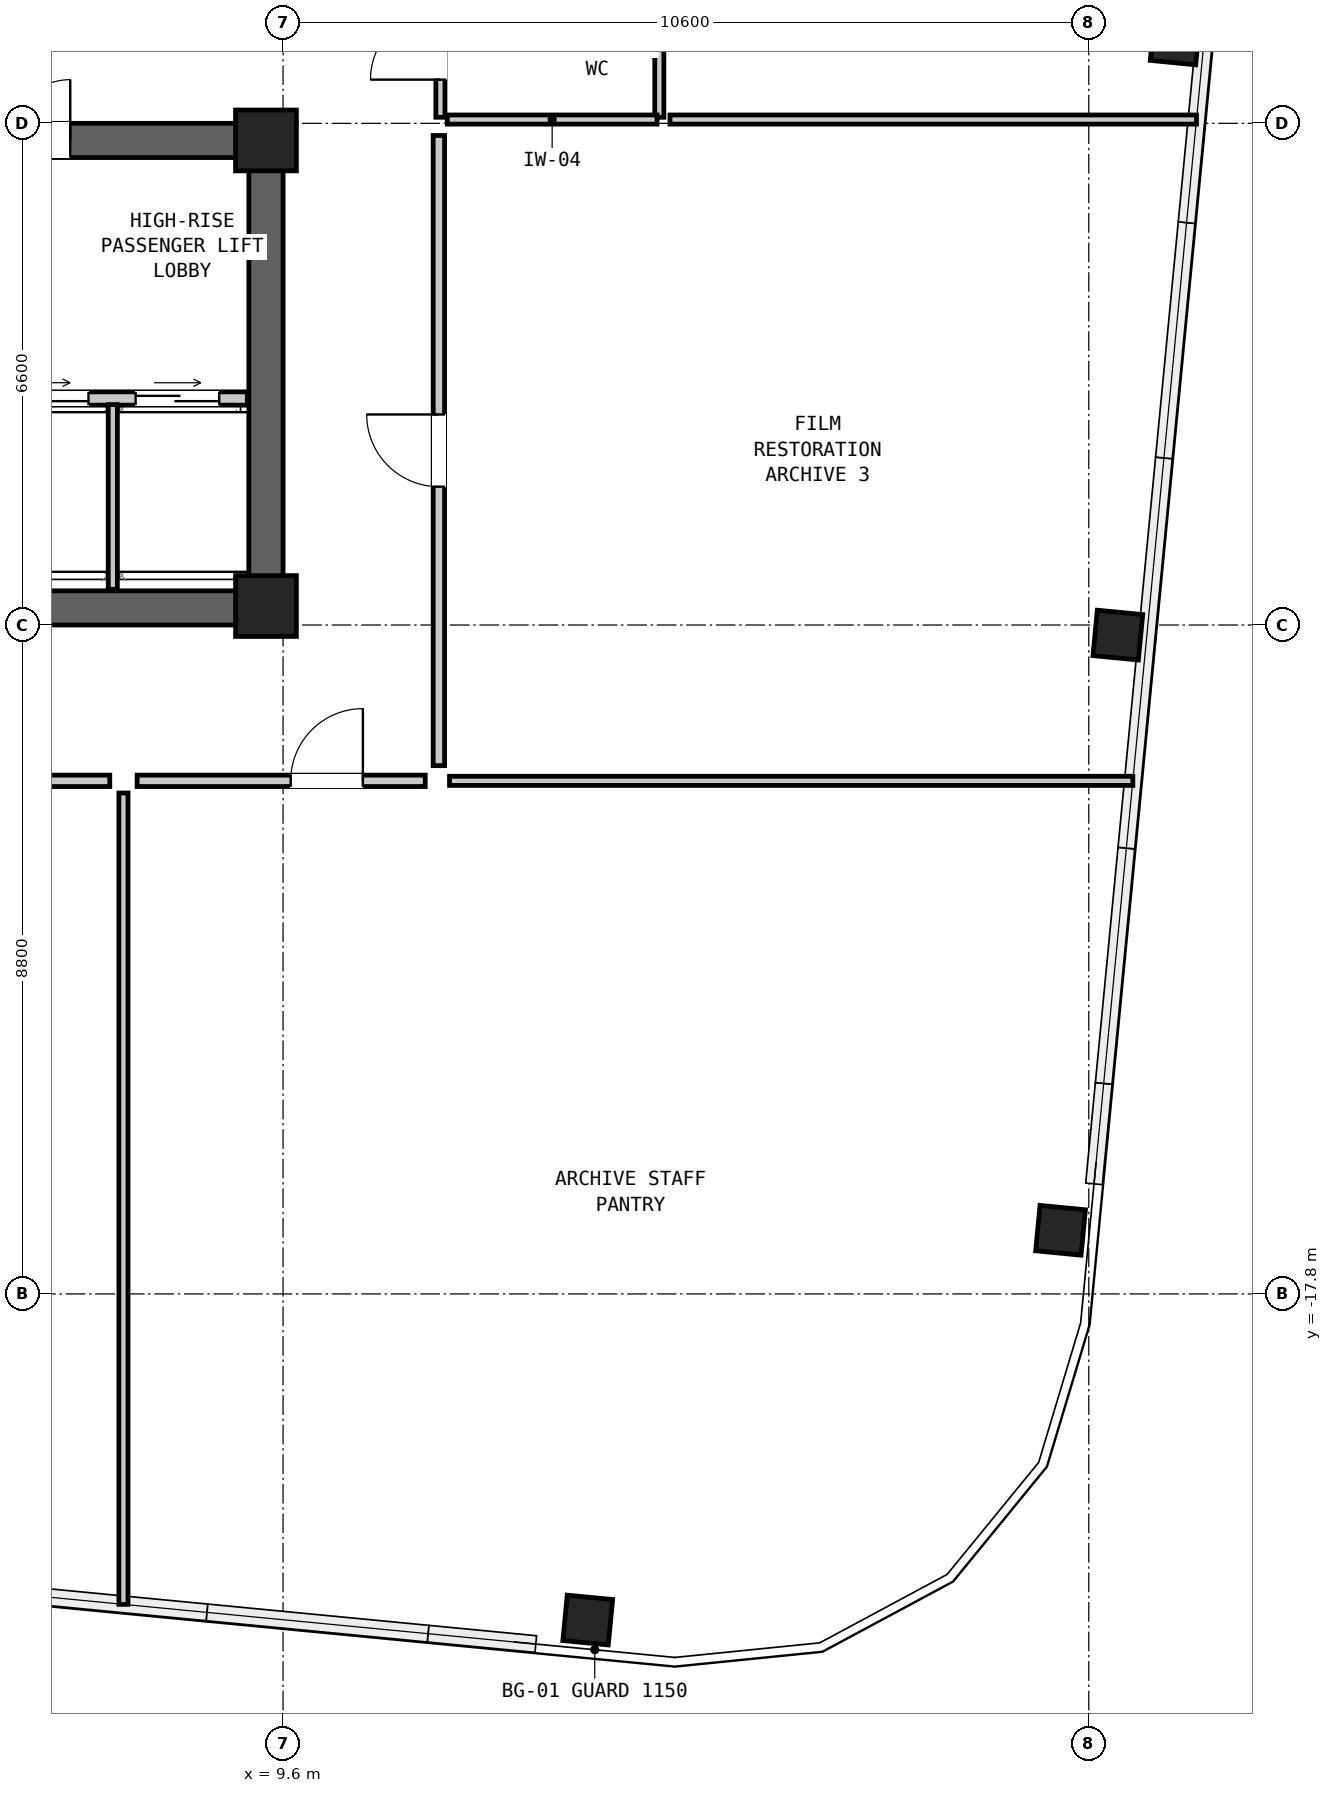
"""IFC4 building model, lengths in metres.
Left out: names, types, materials, properties, quantities, classifications, styles, units other than length and angle.
Written with IfcOpenShell. Run it as: python <this file> out.ifc"""

import sys

from ifc_helpers import new_model, si_unit, direction, frame, frame_2d, origin, origin_2d, place, context, subcontext, project, spatial, rectangle, hollow_rectangle, extrude, element, fill, save


model = new_model("IFC4")
c1 = context("Model", 3, precision=1e-05, world=origin(), true_north=direction((0.0, 1.0)))
c2 = subcontext(c1, "Body", "Model", "MODEL_VIEW")
j1 = project(units=[si_unit("LENGTHUNIT", "METRE"), si_unit("PLANEANGLEUNIT", "RADIAN")], contexts=[c1])
p1 = place(None, origin())
s1 = spatial("IfcSite", under=j1, at=p1, CompositionType="ELEMENT")
p2 = place(p1, origin())
s2 = spatial("IfcBuilding", under=s1, at=p2, CompositionType="ELEMENT")
p3 = place(p2, frame((0.0, 0.0, 261.15)))
s3 = spatial("IfcBuildingStorey", under=s2, at=p3, CompositionType="ELEMENT", Elevation=261.15)
p4 = place(p3, frame((-9.6, -8.775, 0.0), z_axis=(0.0, 0.0, 1.0), x_axis=(1.0, 0.0, 0.0)))
e1 = element("IfcWall", 1, at=p4, inside=s3, PredefinedType="SHEAR", context=c2, shape_type="SweptSolid", body=[
    extrude(rectangle(XDim=19.2, YDim=0.45, at=frame_2d((9.6, 0.0))), origin(), (0.0, 0.0, 1.0), 3.05),
])
p5 = place(p3, frame((-9.6, -2.625, 0.0), z_axis=(0.0, 0.0, 1.0), x_axis=(1.0, 0.0, 0.0)))
e2 = element("IfcWall", 2, at=p5, inside=s3, PredefinedType="SHEAR", context=c2, shape_type="SweptSolid", body=[
    extrude(rectangle(XDim=19.2, YDim=0.45, at=frame_2d((9.6, 0.0))), origin(), (0.0, 0.0, 1.0), 3.05),
])
p6 = place(p5, frame((3.8, 0.0, 0.0)))
e3 = element("IfcOpeningElement", 3, at=p6, cuts=e2, PredefinedType="OPENING", context=c2, shape_type="SweptSolid", body=[
    extrude(rectangle(XDim=1.1, YDim=2.08, at=frame_2d((0.55, 1.04))), frame((0.0, 0.237, 0.0), z_axis=(0.0, -1.0, 0.0), x_axis=(1.0, 0.0, 0.0)), (0.0, 0.0, 1.0), 0.474),
])
p7 = place(p5, frame((10.15, 0.0, 0.0)))
e4 = element("IfcOpeningElement", 4, at=p7, cuts=e2, PredefinedType="OPENING", context=c2, shape_type="SweptSolid", body=[
    extrude(rectangle(XDim=0.9, YDim=2.05, at=frame_2d((0.45, 1.025))), frame((0.0, 0.237, 0.0), z_axis=(0.0, -1.0, 0.0), x_axis=(1.0, 0.0, 0.0)), (0.0, 0.0, 1.0), 0.474),
])
p8 = place(p5, frame((12.1, 0.0, 0.0)))
e5 = element("IfcOpeningElement", 5, at=p8, cuts=e2, PredefinedType="OPENING", context=c2, shape_type="SweptSolid", body=[
    extrude(rectangle(XDim=0.95, YDim=2.1, at=frame_2d((0.475, 1.05))), frame((0.0, 0.237, 0.0), z_axis=(0.0, -1.0, 0.0), x_axis=(1.0, 0.0, 0.0)), (0.0, 0.0, 1.0), 0.474),
])
p9 = place(p5, frame((14.8, 0.0, 0.0)))
e6 = element("IfcOpeningElement", 6, at=p9, cuts=e2, PredefinedType="OPENING", context=c2, shape_type="SweptSolid", body=[
    extrude(rectangle(XDim=1.6, YDim=2.12, at=frame_2d((0.8, 1.06))), frame((0.0, 0.237, 0.0), z_axis=(0.0, -1.0, 0.0), x_axis=(1.0, 0.0, 0.0)), (0.0, 0.0, 1.0), 0.474),
])
p10 = place(p3, frame((9.375, -9.0, 0.0), z_axis=(0.0, 0.0, 1.0), x_axis=(0.0, 1.0, 0.0)))
e7 = element("IfcWall", 7, at=p10, inside=s3, PredefinedType="SHEAR", context=c2, shape_type="SweptSolid", body=[
    extrude(rectangle(XDim=6.6, YDim=0.45, at=frame_2d((3.3, 0.0))), origin(), (0.0, 0.0, 1.0), 3.05),
])
for number, where, z_axis, x_axis in (
    (8, (13.608, -22.09, 0.0), (0.0, 0.0, 1.0), (0.995, -0.096, 0.0)),
    (9, (19.829, -16.963, 0.0), (0.0, 0.0, 1.0), (0.096, 0.995, 0.0)),
    (10, (20.583, -9.133, 0.0), (0.0, 0.0, 1.0), (0.096, 0.995, 0.0)),
    (11, (21.336, -1.302, 0.0), (0.0, 0.0, 1.0), (0.096, 0.995, 0.0)),
):
    element("IfcColumn", number, at=place(p3, frame(where, z_axis=z_axis, x_axis=x_axis)), inside=s3, PredefinedType="COLUMN", context=c2, shape_type="SweptSolid", body=[
        extrude(hollow_rectangle(XDim=0.6, YDim=0.6, WallThickness=0.04, at=origin_2d()), origin(), (0.0, 0.0, 1.0), 3.05),
    ])
for number, where, z_axis, x_axis in (
    (12, (9.375, -2.625, 0.0), (0.0, 0.0, 1.0), (1.0, 0.0, 0.0)),
    (13, (9.375, -8.75, 0.0), (0.0, 0.0, 1.0), (1.0, 0.0, 0.0)),
):
    element("IfcColumn", number, at=place(p3, frame(where, z_axis=z_axis, x_axis=x_axis)), inside=s3, PredefinedType="COLUMN", context=c2, shape_type="SweptSolid", body=[
        extrude(rectangle(XDim=0.8, YDim=0.8, at=origin_2d()), origin(), (0.0, 0.0, 1.0), 3.05),
    ])
p11 = place(p3, frame((4.0, -6.02, 0.0), z_axis=(0.0, 0.0, 1.0), x_axis=(1.0, 0.0, 0.0)))
e14 = element("IfcWall", 14, at=p11, inside=s3, PredefinedType="PARTITIONING", context=c2, shape_type="SweptSolid", body=[
    extrude(rectangle(XDim=5.13, YDim=0.175, at=frame_2d((2.565, 0.0))), origin(), (0.0, 0.0, 1.0), 2.86),
])
p12 = place(p11, frame((0.22, 0.0, 0.0)))
e15 = element("IfcOpeningElement", 15, at=p12, cuts=e14, PredefinedType="OPENING", context=c2, shape_type="SweptSolid", body=[
    extrude(rectangle(XDim=1.1, YDim=2.06, at=frame_2d((0.55, 1.03))), frame((0.0, 0.1, 0.0), z_axis=(0.0, -1.0, 0.0), x_axis=(1.0, 0.0, 0.0)), (0.0, 0.0, 1.0), 0.199),
])
p13 = place(p11, frame((1.94, 0.0, 0.0)))
e16 = element("IfcOpeningElement", 16, at=p13, cuts=e14, PredefinedType="OPENING", context=c2, shape_type="SweptSolid", body=[
    extrude(rectangle(XDim=1.1, YDim=2.06, at=frame_2d((0.55, 1.03))), frame((0.0, 0.1, 0.0), z_axis=(0.0, -1.0, 0.0), x_axis=(1.0, 0.0, 0.0)), (0.0, 0.0, 1.0), 0.199),
])
p14 = place(p11, frame((3.66, 0.0, 0.0)))
e17 = element("IfcOpeningElement", 17, at=p14, cuts=e14, PredefinedType="OPENING", context=c2, shape_type="SweptSolid", body=[
    extrude(rectangle(XDim=1.1, YDim=2.06, at=frame_2d((0.55, 1.03))), frame((0.0, 0.1, 0.0), z_axis=(0.0, -1.0, 0.0), x_axis=(1.0, 0.0, 0.0)), (0.0, 0.0, 1.0), 0.199),
])
p15 = place(p3, frame((7.36, -8.53, 0.0), z_axis=(0.0, 0.0, 1.0), x_axis=(0.0, 1.0, 0.0)))
e18 = element("IfcWall", 18, at=p15, inside=s3, PredefinedType="PARTITIONING", context=c2, shape_type="SweptSolid", body=[
    extrude(rectangle(XDim=2.43, YDim=0.12, at=frame_2d((1.215, 0.0))), origin(), (0.0, 0.0, 1.0), 2.86),
])
p16 = place(p3, frame((11.67, -2.32, 0.0), z_axis=(0.0, 0.0, 1.0), x_axis=(0.0, 1.0, 0.0)))
e19 = element("IfcWall", 19, at=p16, inside=s3, PredefinedType="PARTITIONING", context=c2, shape_type="SweptSolid", body=[
    extrude(rectangle(XDim=1.94, YDim=0.12, at=frame_2d((0.97, 0.0))), origin(), (0.0, 0.0, 1.0), 2.86),
])
p17 = place(p16, frame((0.495, 0.0, 0.0)))
e20 = element("IfcOpeningElement", 20, at=p17, cuts=e19, PredefinedType="OPENING", context=c2, shape_type="SweptSolid", body=[
    extrude(rectangle(XDim=0.92, YDim=2.1, at=frame_2d((0.46, 1.05))), frame((0.0, 0.072, 0.0), z_axis=(0.0, -1.0, 0.0), x_axis=(1.0, 0.0, 0.0)), (0.0, 0.0, 1.0), 0.144),
])
p18 = place(p3, frame((14.55, -2.32, 0.0), z_axis=(0.0, 0.0, 1.0), x_axis=(0.0, 1.0, 0.0)))
e21 = element("IfcWall", 21, at=p18, inside=s3, PredefinedType="PARTITIONING", context=c2, shape_type="SweptSolid", body=[
    extrude(rectangle(XDim=5.93, YDim=0.12, at=frame_2d((2.965, 0.0))), origin(), (0.0, 0.0, 1.0), 2.86),
])
p19 = place(p3, frame((11.76, -2.35, 0.0), z_axis=(0.0, 0.0, 1.0), x_axis=(1.0, 0.0, 0.0)))
e22 = element("IfcWall", 22, at=p19, inside=s3, PredefinedType="PARTITIONING", context=c2, shape_type="SweptSolid", body=[
    extrude(rectangle(XDim=2.76, YDim=0.12, at=frame_2d((1.38, 0.0))), origin(), (0.0, 0.0, 1.0), 1.981),
])
p20 = place(p3, frame((11.79, -11.05, 0.0), z_axis=(0.0, 0.0, 1.0), x_axis=(1.0, 0.0, 0.0)))
e23 = element("IfcWall", 23, at=p20, inside=s3, PredefinedType="PARTITIONING", context=c2, shape_type="SweptSolid", body=[
    extrude(rectangle(XDim=8.99, YDim=0.12, at=frame_2d((4.495, 0.0))), origin(), (0.0, 0.0, 1.0), 2.86),
])
p21 = place(p3, frame((7.5, -21.884, 0.0), z_axis=(0.0, 0.0, 1.0), x_axis=(0.0, 1.0, 0.0)))
e24 = element("IfcWall", 24, at=p21, inside=s3, PredefinedType="PARTITIONING", context=c2, shape_type="SweptSolid", body=[
    extrude(rectangle(XDim=10.674, YDim=0.12, at=frame_2d((5.337, 0.0))), origin(), (0.0, 0.0, 1.0), 2.86),
])
p22 = place(p3, frame((14.69, -2.35, 0.0), z_axis=(0.0, 0.0, 1.0), x_axis=(1.0, 0.0, 0.0)))
e25 = element("IfcWall", 25, at=p22, inside=s3, PredefinedType="PARTITIONING", context=c2, shape_type="SweptSolid", body=[
    extrude(rectangle(XDim=6.927, YDim=0.12, at=frame_2d((3.464, 0.0))), origin(), (0.0, 0.0, 1.0), 1.981),
])
p23 = place(p3, frame((1.68, -11.05, 0.0), z_axis=(0.0, 0.0, 1.0), x_axis=(1.0, 0.0, 0.0)))
e26 = element("IfcWall", 26, at=p23, inside=s3, PredefinedType="PARTITIONING", context=c2, shape_type="SweptSolid", body=[
    extrude(rectangle(XDim=5.64, YDim=0.15, at=frame_2d((2.82, 0.0))), origin(), (0.0, 0.0, 1.0), 2.86),
])
p24 = place(p23, frame((2.22, 0.0, 0.0)))
e27 = element("IfcOpeningElement", 27, at=p24, cuts=e26, PredefinedType="OPENING", context=c2, shape_type="SweptSolid", body=[
    extrude(rectangle(XDim=1.2, YDim=2.1, at=frame_2d((0.6, 1.05))), frame((0.0, 0.087, 0.0), z_axis=(0.0, -1.0, 0.0), x_axis=(1.0, 0.0, 0.0)), (0.0, 0.0, 1.0), 0.174),
])
p25 = place(p3, frame((7.68, -11.05, 0.0), z_axis=(0.0, 0.0, 1.0), x_axis=(1.0, 0.0, 0.0)))
e28 = element("IfcWall", 28, at=p25, inside=s3, PredefinedType="PARTITIONING", context=c2, shape_type="SweptSolid", body=[
    extrude(rectangle(XDim=3.79, YDim=0.15, at=frame_2d((1.895, 0.0))), origin(), (0.0, 0.0, 1.0), 2.86),
])
p26 = place(p25, frame((2.02, 0.0, 0.0)))
e29 = element("IfcOpeningElement", 29, at=p26, cuts=e28, PredefinedType="OPENING", context=c2, shape_type="SweptSolid", body=[
    extrude(rectangle(XDim=0.95, YDim=2.1, at=frame_2d((0.475, 1.05))), frame((0.0, 0.087, 0.0), z_axis=(0.0, -1.0, 0.0), x_axis=(1.0, 0.0, 0.0)), (0.0, 0.0, 1.0), 0.174),
])
p27 = place(p3, frame((11.65, -10.85, 0.0), z_axis=(0.0, 0.0, 1.0), x_axis=(0.0, 1.0, 0.0)))
e30 = element("IfcWall", 30, at=p27, inside=s3, PredefinedType="PARTITIONING", context=c2, shape_type="SweptSolid", body=[
    extrude(rectangle(XDim=8.29, YDim=0.15, at=frame_2d((4.145, 0.0))), origin(), (0.0, 0.0, 1.0), 2.86),
])
p28 = place(p27, frame((3.67, 0.0, 0.0)))
e31 = element("IfcOpeningElement", 31, at=p28, cuts=e30, PredefinedType="OPENING", context=c2, shape_type="SweptSolid", body=[
    extrude(rectangle(XDim=0.95, YDim=2.1, at=frame_2d((0.475, 1.05))), frame((0.0, 0.087, 0.0), z_axis=(0.0, -1.0, 0.0), x_axis=(1.0, 0.0, 0.0)), (0.0, 0.0, 1.0), 0.174),
])
p29 = place(p13, origin())
e32 = element("IfcDoor", 32, at=p29, inside=s3, OperationType="DOUBLE_DOOR_SLIDING", PredefinedType="DOOR", context=c2, shape_type="SweptSolid", body=[
    extrude(rectangle(XDim=1.1, YDim=2.06, at=frame_2d((0.55, 1.03))), frame((0.0, 0.025, 0.0), z_axis=(0.0, -1.0, 0.0), x_axis=(1.0, 0.0, 0.0)), (0.0, 0.0, 1.0), 0.05),
])
fill(e16, e32)
p30 = place(p14, origin())
e33 = element("IfcDoor", 33, at=p30, inside=s3, OperationType="DOUBLE_DOOR_SLIDING", PredefinedType="DOOR", context=c2, shape_type="SweptSolid", body=[
    extrude(rectangle(XDim=1.1, YDim=2.06, at=frame_2d((0.55, 1.03))), frame((0.0, 0.025, 0.0), z_axis=(0.0, -1.0, 0.0), x_axis=(1.0, 0.0, 0.0)), (0.0, 0.0, 1.0), 0.05),
])
fill(e17, e33)
p31 = place(p9, origin())
e34 = element("IfcDoor", 34, at=p31, inside=s3, OperationType="DOUBLE_DOOR_SINGLE_SWING", PredefinedType="DOOR", context=c2, shape_type="SweptSolid", body=[
    extrude(rectangle(XDim=1.6, YDim=2.12, at=frame_2d((0.8, 1.06))), frame((0.0, 0.025, 0.0), z_axis=(0.0, -1.0, 0.0), x_axis=(1.0, 0.0, 0.0)), (0.0, 0.0, 1.0), 0.05),
])
fill(e6, e34)
p32 = place(p17, origin())
e35 = element("IfcDoor", 35, at=p32, inside=s3, OperationType="SINGLE_SWING_LEFT", PredefinedType="DOOR", context=c2, shape_type="SweptSolid", body=[
    extrude(rectangle(XDim=0.92, YDim=2.1, at=frame_2d((0.46, 1.05))), frame((0.0, 0.025, 0.0), z_axis=(0.0, -1.0, 0.0), x_axis=(1.0, 0.0, 0.0)), (0.0, 0.0, 1.0), 0.05),
])
fill(e20, e35)
p33 = place(p26, origin())
e36 = element("IfcDoor", 36, at=p33, inside=s3, OperationType="SINGLE_SWING_RIGHT", PredefinedType="DOOR", context=c2, shape_type="SweptSolid", body=[
    extrude(rectangle(XDim=0.95, YDim=2.1, at=frame_2d((0.475, 1.05))), frame((0.0, 0.025, 0.0), z_axis=(0.0, -1.0, 0.0), x_axis=(1.0, 0.0, 0.0)), (0.0, 0.0, 1.0), 0.05),
])
fill(e29, e36)
p34 = place(p28, origin())
e37 = element("IfcDoor", 37, at=p34, inside=s3, OperationType="SINGLE_SWING_RIGHT", PredefinedType="DOOR", context=c2, shape_type="SweptSolid", body=[
    extrude(rectangle(XDim=0.95, YDim=2.1, at=frame_2d((0.475, 1.05))), frame((0.0, 0.025, 0.0), z_axis=(0.0, -1.0, 0.0), x_axis=(1.0, 0.0, 0.0)), (0.0, 0.0, 1.0), 0.05),
])
fill(e31, e37)
save(model, sys.argv[1])
